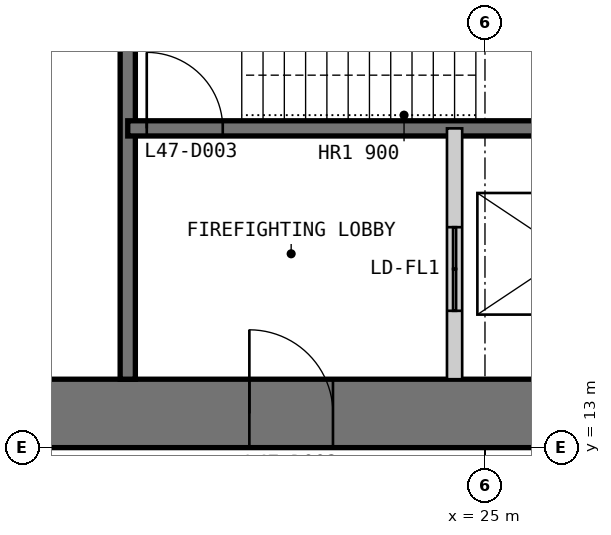
"""IFC4 building model, lengths in metres.
Left out: names, types, materials, properties, quantities, classifications, styles, units other than length and angle.
Written with IfcOpenShell. Run it as: python <this file> out.ifc"""

import sys

from ifc_helpers import new_model, si_unit, direction, frame, frame_2d, origin, place, context, subcontext, project, spatial, polyline, rectangle, outline, extrude, element, fill, save


model = new_model("IFC4")
c1 = context("Model", 3, precision=1e-05, world=origin(), true_north=direction((0.0, 1.0)))
c2 = subcontext(c1, "Body", "Model", "MODEL_VIEW")
j1 = project(units=[si_unit("LENGTHUNIT", "METRE"), si_unit("PLANEANGLEUNIT", "RADIAN")], contexts=[c1])
p1 = place(None, origin())
s1 = spatial("IfcSite", under=j1, at=p1, CompositionType="ELEMENT")
p2 = place(p1, origin())
s2 = spatial("IfcBuilding", under=s1, at=p2, CompositionType="ELEMENT")
p3 = place(p2, frame((0.0, 0.0, 201.8)))
s3 = spatial("IfcBuildingStorey", under=s2, at=p3, CompositionType="ELEMENT", Elevation=201.8)
p4 = place(p3, frame((13.0, 13.45, 0.0), z_axis=(0.0, 0.0, 1.0), x_axis=(1.0, 0.0, 0.0)))
e1 = element("IfcWall", 1, at=p4, inside=s3, PredefinedType="SHEAR", context=c2, shape_type="SweptSolid", body=[
    extrude(outline(polyline([(0.0, -0.45), (24.0, -0.45), (23.1, 0.45), (0.9, 0.45), (0.0, -0.45)])), origin(), (0.0, 0.0, 1.0), 4.0),
])
p5 = place(p4, frame((4.9, 0.0, 0.0)))
e2 = element("IfcOpeningElement", 2, at=p5, cuts=e1, PredefinedType="OPENING", context=c2, shape_type="SweptSolid", body=[
    extrude(rectangle(XDim=1.0, YDim=2.2, at=frame_2d((0.5, 1.1))), frame((0.0, 0.46, 0.0), z_axis=(0.0, -1.0, 0.0), x_axis=(1.0, 0.0, 0.0)), (0.0, 0.0, 1.0), 0.92),
])
p6 = place(p4, frame((8.9, 0.0, 0.0)))
e3 = element("IfcOpeningElement", 3, at=p6, cuts=e1, PredefinedType="OPENING", context=c2, shape_type="SweptSolid", body=[
    extrude(rectangle(XDim=1.1, YDim=2.2, at=frame_2d((0.55, 1.1))), frame((0.0, 0.46, 0.0), z_axis=(0.0, -1.0, 0.0), x_axis=(1.0, 0.0, 0.0)), (0.0, 0.0, 1.0), 0.92),
])
p7 = place(p4, frame((15.05, 0.0, 0.0)))
e4 = element("IfcOpeningElement", 4, at=p7, cuts=e1, PredefinedType="OPENING", context=c2, shape_type="SweptSolid", body=[
    extrude(rectangle(XDim=0.9, YDim=2.2, at=frame_2d((0.45, 1.1))), frame((0.0, 0.46, 0.0), z_axis=(0.0, -1.0, 0.0), x_axis=(1.0, 0.0, 0.0)), (0.0, 0.0, 1.0), 0.92),
])
p8 = place(p4, frame((17.9, 0.0, 0.0)))
e5 = element("IfcOpeningElement", 5, at=p8, cuts=e1, PredefinedType="OPENING", context=c2, shape_type="SweptSolid", body=[
    extrude(rectangle(XDim=1.0, YDim=2.2, at=frame_2d((0.5, 1.1))), frame((0.0, 0.46, 0.0), z_axis=(0.0, -1.0, 0.0), x_axis=(1.0, 0.0, 0.0)), (0.0, 0.0, 1.0), 0.92),
])
p9 = place(p4, frame((21.4, 0.0, 0.0)))
e6 = element("IfcOpeningElement", 6, at=p9, cuts=e1, PredefinedType="OPENING", context=c2, shape_type="SweptSolid", body=[
    extrude(rectangle(XDim=1.0, YDim=2.2, at=frame_2d((0.5, 1.1))), frame((0.0, 0.46, 0.0), z_axis=(0.0, -1.0, 0.0), x_axis=(1.0, 0.0, 0.0)), (0.0, 0.0, 1.0), 0.92),
])
p10 = place(p3, frame((20.3, 13.9, 0.0), z_axis=(0.0, 0.0, 1.0), x_axis=(0.0, 1.0, 0.0)))
e7 = element("IfcWall", 7, at=p10, inside=s3, PredefinedType="SOLIDWALL", context=c2, shape_type="SweptSolid", body=[
    extrude(rectangle(XDim=16.1, YDim=0.2, at=frame_2d((8.05, 0.0))), origin(), (0.0, 0.0, 1.0), 3.8),
])
p11 = place(p10, frame((6.4, 0.0, 0.0)))
e8 = element("IfcOpeningElement", 8, at=p11, cuts=e7, PredefinedType="OPENING", context=c2, shape_type="SweptSolid", body=[
    extrude(rectangle(XDim=0.9, YDim=2.2, at=frame_2d((0.45, 1.1))), frame((0.0, 0.11, 0.0), z_axis=(0.0, -1.0, 0.0), x_axis=(1.0, 0.0, 0.0)), (0.0, 0.0, 1.0), 0.22),
])
p12 = place(p10, frame((11.4, 0.0, 0.0)))
e9 = element("IfcOpeningElement", 9, at=p12, cuts=e7, PredefinedType="OPENING", context=c2, shape_type="SweptSolid", body=[
    extrude(rectangle(XDim=0.9, YDim=2.2, at=frame_2d((0.45, 1.1))), frame((0.0, 0.11, 0.0), z_axis=(0.0, -1.0, 0.0), x_axis=(1.0, 0.0, 0.0)), (0.0, 0.0, 1.0), 0.22),
])
p13 = place(p3, frame((20.3, 17.2, 0.0), z_axis=(0.0, 0.0, 1.0), x_axis=(1.0, 0.0, 0.0)))
e10 = element("IfcWall", 10, at=p13, inside=s3, PredefinedType="SOLIDWALL", context=c2, shape_type="SweptSolid", body=[
    extrude(rectangle(XDim=9.4, YDim=0.2, at=frame_2d((4.7, 0.0))), origin(), (0.0, 0.0, 1.0), 3.8),
])
p14 = place(p13, frame((0.25, 0.0, 0.0)))
e11 = element("IfcOpeningElement", 11, at=p14, cuts=e10, PredefinedType="OPENING", context=c2, shape_type="SweptSolid", body=[
    extrude(rectangle(XDim=1.0, YDim=2.2, at=frame_2d((0.5, 1.1))), frame((0.0, 0.11, 0.0), z_axis=(0.0, -1.0, 0.0), x_axis=(1.0, 0.0, 0.0)), (0.0, 0.0, 1.0), 0.22),
])
p15 = place(p3, frame((24.6, 13.9, 0.0), z_axis=(0.0, 0.0, 1.0), x_axis=(0.0, 1.0, 0.0)))
e12 = element("IfcWall", 12, at=p15, inside=s3, PredefinedType="PARTITIONING", context=c2, shape_type="SweptSolid", body=[
    extrude(rectangle(XDim=3.3, YDim=0.2, at=frame_2d((1.65, 0.0))), origin(), (0.0, 0.0, 1.0), 3.8),
])
p16 = place(p15, frame((0.9, 0.0, 0.0)))
e13 = element("IfcOpeningElement", 13, at=p16, cuts=e12, PredefinedType="OPENING", context=c2, shape_type="SweptSolid", body=[
    extrude(rectangle(XDim=1.1, YDim=2.2, at=frame_2d((0.55, 1.1))), frame((0.0, 0.11, 0.0), z_axis=(0.0, -1.0, 0.0), x_axis=(1.0, 0.0, 0.0)), (0.0, 0.0, 1.0), 0.22),
])
p17 = place(p6, origin())
e14 = element("IfcDoor", 14, at=p17, inside=s3, OperationType="SINGLE_SWING_LEFT", PredefinedType="DOOR", context=c2, shape_type="SweptSolid", body=[
    extrude(rectangle(XDim=1.1, YDim=2.2, at=frame_2d((0.55, 1.1))), frame((0.0, 0.025, 0.0), z_axis=(0.0, -1.0, 0.0), x_axis=(1.0, 0.0, 0.0)), (0.0, 0.0, 1.0), 0.05),
    extrude(outline(polyline([(0.0, 0.0), (0.04, 0.0), (0.04, 2.16), (1.06, 2.16), (1.06, 0.0), (1.1, 0.0), (1.1, 2.2), (0.0, 2.2), (0.0, 0.0)])), frame((0.0, 0.3, 0.0), z_axis=(0.0, -1.0, 0.0), x_axis=(1.0, 0.0, 0.0)), (0.0, 0.0, 1.0), 0.6),
])
fill(e3, e14)
p18 = place(p14, origin())
e15 = element("IfcDoor", 15, at=p18, inside=s3, OperationType="SINGLE_SWING_LEFT", PredefinedType="DOOR", context=c2, shape_type="SweptSolid", body=[
    extrude(rectangle(XDim=1.0, YDim=2.2, at=frame_2d((0.5, 1.1))), frame((0.0, 0.025, 0.0), z_axis=(0.0, -1.0, 0.0), x_axis=(1.0, 0.0, 0.0)), (0.0, 0.0, 1.0), 0.05),
])
fill(e11, e15)
p19 = place(p16, origin())
e16 = element("IfcDoor", 16, at=p19, inside=s3, OperationType="DOUBLE_DOOR_SLIDING", PredefinedType="DOOR", context=c2, shape_type="SweptSolid", body=[
    extrude(rectangle(XDim=1.1, YDim=2.2, at=frame_2d((0.55, 1.1))), frame((0.0, 0.025, 0.0), z_axis=(0.0, -1.0, 0.0), x_axis=(1.0, 0.0, 0.0)), (0.0, 0.0, 1.0), 0.05),
])
fill(e13, e16)
save(model, sys.argv[1])
